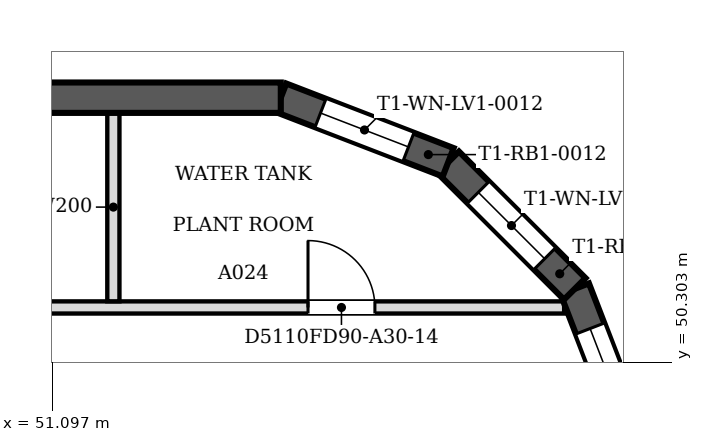
"""IFC4 building model, lengths in metres.
Left out: names, types, materials, properties, quantities, classifications, styles, units other than length and angle.
Written with IfcOpenShell. Run it as: python <this file> out.ifc"""

import sys

from ifc_helpers import new_model, si_unit, direction, frame, frame_2d, origin, place, context, subcontext, project, spatial, polyline, rectangle, outline, extrude, faceted_brep, source, transform, mapped, element, fill, save


model = new_model("IFC4")
c1 = context("Model", 3, precision=1e-05, world=origin(), true_north=direction((0.0, 1.0)))
c2 = subcontext(c1, "Body", "Model", "MODEL_VIEW")
j1 = project(units=[si_unit("LENGTHUNIT", "METRE"), si_unit("PLANEANGLEUNIT", "RADIAN")], contexts=[c1])
p1 = place(None, origin())
s1 = spatial("IfcSite", under=j1, at=p1, CompositionType="ELEMENT")
p2 = place(p1, origin())
s2 = spatial("IfcBuilding", under=s1, at=p2, CompositionType="ELEMENT")
p3 = place(p2, frame((0.0, 0.0, 63.8)))
s3 = spatial("IfcBuildingStorey", under=s2, at=p3, CompositionType="ELEMENT", Elevation=63.8)
m1 = source(origin(), c2, "Body", "Brep", [
    faceted_brep([(0.0, -0.25, 0.0), (2.95, -0.25, 0.0), (2.95, -0.25, 4.8), (0.0, -0.25, 4.8), (0.047, 0.25, 4.8), (2.898, 0.25, 4.8), (2.898, 0.25, 0.0), (0.047, 0.25, 0.0), (2.95, 0.0, 0.0), (0.0, 0.0, 0.0), (2.95, 0.0, 4.8), (0.0, 0.0, 4.8)], [[[0, 1, 2, 3]], [[4, 5, 6, 7]], [[7, 6, 8, 1, 0, 9]], [[10, 2, 1, 8]], [[5, 4, 11, 3, 2, 10]], [[9, 0, 3, 11]], [[7, 9, 11, 4]], [[8, 6, 5, 10]]]),
])
p4 = place(p3, frame((60.75, 48.753, 0.0), z_axis=(0.0, 0.0, 1.0), x_axis=(-0.359877213415, 0.932999673775, 0.0)))
e1 = element("IfcWall", 1, at=p4, inside=s3, PredefinedType="SOLIDWALL", context=c2, shape_type="MappedRepresentation", body=[
    mapped(m1, transform((0.0, 0.0, 0.0), scale=1.0)),
])
m2 = source(origin(), c2, "Body", "SweptSolid", [
    extrude(outline(polyline([(0.7, 0.8), (2.25, 0.8), (2.25, 4.0), (0.7, 4.0), (0.7, 0.8)])), frame((0.0, 0.26, 0.0), z_axis=(0.0, -1.0, 0.0), x_axis=(1.0, 0.0, 0.0)), (0.0, 0.0, 1.0), 0.52),
])
p5 = place(p4, origin())
e2 = element("IfcOpeningElement", 2, at=p5, cuts=e1, PredefinedType="OPENING", context=c2, shape_type="MappedRepresentation", body=[
    mapped(m2, transform((0.0, 0.0, 0.0), scale=1.0)),
])
m3 = source(origin(), c2, "Body", "Brep", [
    faceted_brep([(0.0, -0.25, 0.0), (2.944, -0.25, 0.0), (2.944, -0.25, 4.8), (0.0, -0.25, 4.8), (0.053, 0.25, 4.8), (2.891, 0.25, 4.8), (2.891, 0.25, 0.0), (0.053, 0.25, 0.0), (2.944, 0.0, 0.0), (0.0, 0.0, 0.0), (2.944, 0.0, 4.8), (0.0, 0.0, 4.8)], [[[0, 1, 2, 3]], [[4, 5, 6, 7]], [[7, 6, 8, 1, 0, 9]], [[10, 2, 1, 8]], [[5, 4, 11, 3, 2, 10]], [[9, 0, 3, 11]], [[7, 9, 11, 4]], [[8, 6, 5, 10]]]),
])
p6 = place(p3, frame((59.688, 51.506, 0.0), z_axis=(0.0, 0.0, 1.0), x_axis=(-0.707106781187, 0.707106781187, 0.0)))
e3 = element("IfcWall", 3, at=p6, inside=s3, PredefinedType="SOLIDWALL", context=c2, shape_type="MappedRepresentation", body=[
    mapped(m3, transform((0.0, 0.0, 0.0), scale=1.0)),
])
m4 = source(origin(), c2, "Body", "SweptSolid", [
    extrude(outline(polyline([(0.7, 0.8), (2.244, 0.8), (2.244, 4.0), (0.7, 4.0), (0.7, 0.8)])), frame((0.0, 0.26, 0.0), z_axis=(0.0, -1.0, 0.0), x_axis=(1.0, 0.0, 0.0)), (0.0, 0.0, 1.0), 0.52),
])
p7 = place(p6, origin())
e4 = element("IfcOpeningElement", 4, at=p7, cuts=e3, PredefinedType="OPENING", context=c2, shape_type="MappedRepresentation", body=[
    mapped(m4, transform((0.0, 0.0, 0.0), scale=1.0)),
])
m5 = source(origin(), c2, "Body", "Brep", [
    faceted_brep([(0.0, -0.25, 0.0), (2.95, -0.25, 0.0), (2.95, -0.25, 4.8), (0.0, -0.25, 4.8), (0.053, 0.25, 4.8), (2.904, 0.25, 4.8), (2.904, 0.25, 0.0), (0.053, 0.25, 0.0), (2.95, 0.0, 0.0), (0.0, 0.0, 0.0), (2.95, 0.0, 4.8), (0.0, 0.0, 4.8)], [[[0, 1, 2, 3]], [[4, 5, 6, 7]], [[7, 6, 8, 1, 0, 9]], [[10, 2, 1, 8]], [[5, 4, 11, 3, 2, 10]], [[9, 0, 3, 11]], [[7, 9, 11, 4]], [[8, 6, 5, 10]]]),
])
p8 = place(p3, frame((57.606, 53.588, 0.0), z_axis=(0.0, 0.0, 1.0), x_axis=(-0.932999673775, 0.359877213415, 0.0)))
e5 = element("IfcWall", 5, at=p8, inside=s3, PredefinedType="SOLIDWALL", context=c2, shape_type="MappedRepresentation", body=[
    mapped(m5, transform((0.0, 0.0, 0.0), scale=1.0)),
])
p9 = place(p8, origin())
e6 = element("IfcOpeningElement", 6, at=p9, cuts=e5, PredefinedType="OPENING", context=c2, shape_type="MappedRepresentation", body=[
    mapped(m2, transform((0.0, 0.0, 0.0), scale=1.0)),
])
m6 = source(origin(), c2, "Body", "Brep", [
    faceted_brep([(0.0, -0.25, 0.0), (12.154, -0.25, 0.0), (12.154, -0.25, 4.8), (0.0, -0.25, 4.8), (0.047, 0.25, 4.8), (12.154, 0.25, 4.8), (12.154, 0.25, 0.0), (0.047, 0.25, 0.0), (0.0, 0.0, 0.0), (0.0, 0.0, 4.8)], [[[0, 1, 2, 3]], [[4, 5, 6, 7]], [[7, 6, 1, 0, 8]], [[5, 4, 9, 3, 2]], [[8, 0, 3, 9]], [[7, 8, 9, 4]], [[1, 6, 5, 2]]]),
])
p10 = place(p3, frame((54.854, 54.65, 0.0), z_axis=(0.0, 0.0, 1.0), x_axis=(-1.0, 0.0, 0.0)))
e7 = element("IfcWall", 7, at=p10, inside=s3, PredefinedType="SOLIDWALL", context=c2, shape_type="MappedRepresentation", body=[
    mapped(m6, transform((0.0, 0.0, 0.0), scale=1.0)),
])
m7 = source(origin(), c2, "Body", "SweptSolid", [
    extrude(outline(polyline([(4.277, 0.8), (7.877, 0.8), (7.877, 4.0), (4.277, 4.0), (4.277, 0.8)])), frame((0.0, 0.26, 0.0), z_axis=(0.0, -1.0, 0.0), x_axis=(1.0, 0.0, 0.0)), (0.0, 0.0, 1.0), 0.52),
])
p11 = place(p10, origin())
e8 = element("IfcOpeningElement", 8, at=p11, cuts=e7, PredefinedType="OPENING", context=c2, shape_type="MappedRepresentation", body=[
    mapped(m7, transform((0.0, 0.0, 0.0), scale=1.0)),
])
p12 = place(p3, frame((28.1, 51.2, 0.0), z_axis=(0.0, 0.0, 1.0), x_axis=(1.0, 0.0, 0.0)))
e9 = element("IfcWall", 9, at=p12, inside=s3, PredefinedType="PARTITIONING", context=c2, shape_type="SweptSolid", body=[
    extrude(rectangle(XDim=31.413, YDim=0.2, at=frame_2d((15.707, 0.0))), origin(), (0.0, 0.0, 1.0), 4.067),
])
m8 = source(origin(), c2, "Body", "SweptSolid", [
    extrude(rectangle(XDim=1.1, YDim=2.1, at=frame_2d((0.55, 1.05))), frame((0.0, 0.11, 0.0), z_axis=(0.0, -1.0, 0.0), x_axis=(1.0, 0.0, 0.0)), (0.0, 0.0, 1.0), 0.22),
])
p13 = place(p12, frame((2.4, 0.0, 0.0)))
e10 = element("IfcOpeningElement", 10, at=p13, cuts=e9, PredefinedType="OPENING", context=c2, shape_type="MappedRepresentation", body=[
    mapped(m8, transform((0.0, 0.0, 0.0), scale=1.0)),
])
p14 = place(p12, frame((27.201, 0.0, 0.0)))
e11 = element("IfcOpeningElement", 11, at=p14, cuts=e9, PredefinedType="OPENING", context=c2, shape_type="MappedRepresentation", body=[
    mapped(m8, transform((0.0, 0.0, 0.0), scale=1.0)),
])
p15 = place(p12, frame((18.901, 0.0, 0.0)))
e12 = element("IfcOpeningElement", 12, at=p15, cuts=e9, PredefinedType="OPENING", context=c2, shape_type="MappedRepresentation", body=[
    mapped(m8, transform((0.0, 0.0, 0.0), scale=1.0)),
])
p16 = place(p12, frame((9.9, 0.0, 0.0)))
e13 = element("IfcOpeningElement", 13, at=p16, cuts=e9, PredefinedType="OPENING", context=c2, shape_type="MappedRepresentation", body=[
    mapped(m8, transform((0.0, 0.0, 0.0), scale=1.0)),
])
p17 = place(p3, frame((52.1, 51.301, 0.0), z_axis=(0.0, 0.0, 1.0), x_axis=(0.0, 1.0, 0.0)))
e14 = element("IfcWall", 14, at=p17, inside=s3, PredefinedType="PARTITIONING", context=c2, shape_type="SweptSolid", body=[
    extrude(rectangle(XDim=3.099, YDim=0.2, at=frame_2d((1.549, 0.0))), origin(), (0.0, 0.0, 1.0), 4.067),
])
m9 = source(origin(), c2, "Body", "SweptSolid", [
    extrude(outline(polyline([(0.7, 0.8), (2.25, 0.8), (2.25, 4.0), (0.7, 4.0), (0.7, 0.8)])), frame((0.0, 0.03, 0.0), z_axis=(0.0, -1.0, 0.0), x_axis=(1.0, 0.0, 0.0)), (0.0, 0.0, 1.0), 0.06),
])
p18 = place(p5, origin())
e15 = element("IfcWindow", 15, at=p18, inside=s3, PartitioningType="USERDEFINED", PredefinedType="WINDOW", context=c2, shape_type="MappedRepresentation", body=[
    mapped(m9, transform((0.0, 0.0, 0.0), scale=1.0)),
])
fill(e2, e15)
m10 = source(origin(), c2, "Body", "SweptSolid", [
    extrude(outline(polyline([(0.7, 0.8), (2.244, 0.8), (2.244, 4.0), (0.7, 4.0), (0.7, 0.8)])), frame((0.0, 0.03, 0.0), z_axis=(0.0, -1.0, 0.0), x_axis=(1.0, 0.0, 0.0)), (0.0, 0.0, 1.0), 0.06),
])
p19 = place(p7, origin())
e16 = element("IfcWindow", 16, at=p19, inside=s3, PartitioningType="USERDEFINED", PredefinedType="WINDOW", context=c2, shape_type="MappedRepresentation", body=[
    mapped(m10, transform((0.0, 0.0, 0.0), scale=1.0)),
])
fill(e4, e16)
p20 = place(p9, origin())
e17 = element("IfcWindow", 17, at=p20, inside=s3, PartitioningType="USERDEFINED", PredefinedType="WINDOW", context=c2, shape_type="MappedRepresentation", body=[
    mapped(m9, transform((0.0, 0.0, 0.0), scale=1.0)),
])
fill(e6, e17)
m11 = source(origin(), c2, "Body", "SweptSolid", [
    extrude(rectangle(XDim=1.1, YDim=2.1, at=frame_2d((0.55, 1.05))), frame((0.0, 0.025, 0.0), z_axis=(0.0, -1.0, 0.0), x_axis=(1.0, 0.0, 0.0)), (0.0, 0.0, 1.0), 0.05),
])
p21 = place(p14, origin())
e18 = element("IfcDoor", 18, at=p21, inside=s3, OperationType="SINGLE_SWING_LEFT", PredefinedType="DOOR", context=c2, shape_type="MappedRepresentation", body=[
    mapped(m11, transform((0.0, 0.0, 0.0), scale=1.0)),
])
fill(e11, e18)
save(model, sys.argv[1])
